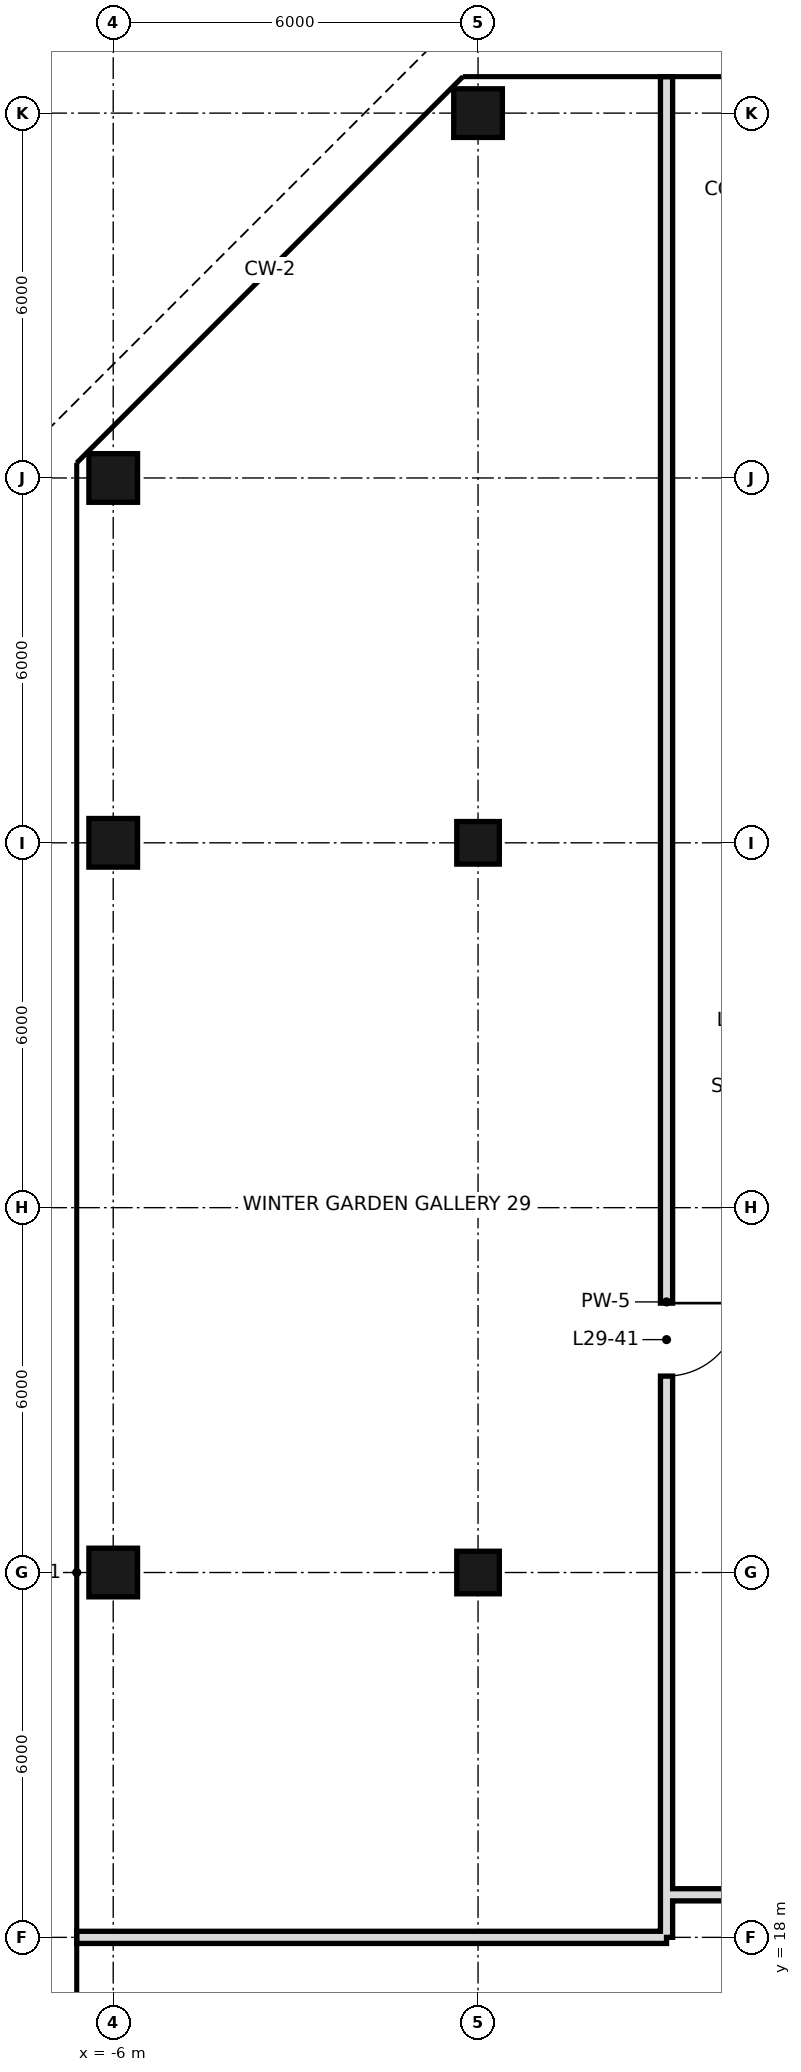
"""IFC4 building model, lengths in metres.
Left out: names, types, materials, properties, quantities, classifications, styles, units other than length and angle.
Written with IfcOpenShell. Run it as: python <this file> out.ifc"""

import sys

from ifc_helpers import new_model, si_unit, direction, frame, frame_2d, origin, origin_2d, place, context, subcontext, project, spatial, rectangle, hollow_rectangle, extrude, element, fill, save


model = new_model("IFC4")
c1 = context("Model", 3, precision=1e-05, world=origin(), true_north=direction((0.0, 1.0)))
c2 = subcontext(c1, "Body", "Model", "MODEL_VIEW")
j1 = project(units=[si_unit("LENGTHUNIT", "METRE"), si_unit("PLANEANGLEUNIT", "RADIAN")], contexts=[c1])
p1 = place(None, origin())
s1 = spatial("IfcSite", under=j1, at=p1, CompositionType="ELEMENT")
p2 = place(p1, origin())
s2 = spatial("IfcBuilding", under=s1, at=p2, CompositionType="ELEMENT")
p3 = place(p2, frame((0.0, 0.0, 130.4)))
s3 = spatial("IfcBuildingStorey", under=s2, at=p3, CompositionType="ELEMENT", Elevation=130.4)
for number, where, z_axis, x_axis in (
    (1, (-6.0, 24.0, 0.0), (0.0, 0.0, 1.0), (1.0, 0.0, 0.0)),
    (2, (-6.0, 36.0, 0.0), (0.0, 0.0, 1.0), (1.0, 0.0, 0.0)),
    (3, (-6.0, 42.0, 0.0), (0.0, 0.0, 1.0), (1.0, 0.0, 0.0)),
):
    element("IfcColumn", number, at=place(p3, frame(where, z_axis=z_axis, x_axis=x_axis)), inside=s3, PredefinedType="COLUMN", context=c2, shape_type="SweptSolid", body=[
        extrude(hollow_rectangle(XDim=0.8, YDim=0.8, WallThickness=0.04, at=origin_2d()), origin(), (0.0, 0.0, 1.0), 3.6),
    ])
for number, where, z_axis, x_axis in (
    (4, (0.0, 24.0, 0.0), (0.0, 0.0, 1.0), (1.0, 0.0, 0.0)),
    (5, (0.0, 36.0, 0.0), (0.0, 0.0, 1.0), (1.0, 0.0, 0.0)),
):
    element("IfcColumn", number, at=place(p3, frame(where, z_axis=z_axis, x_axis=x_axis)), inside=s3, PredefinedType="COLUMN", context=c2, shape_type="SweptSolid", body=[
        extrude(hollow_rectangle(XDim=0.7, YDim=0.7, WallThickness=0.036, at=origin_2d()), origin(), (0.0, 0.0, 1.0), 3.6),
    ])
p4 = place(p3, frame((0.0, 48.0, 0.0), z_axis=(0.0, 0.0, 1.0), x_axis=(1.0, 0.0, 0.0)))
e6 = element("IfcColumn", 6, at=p4, inside=s3, PredefinedType="COLUMN", context=c2, shape_type="SweptSolid", body=[
    extrude(hollow_rectangle(XDim=0.8, YDim=0.8, WallThickness=0.04, at=origin_2d()), origin(), (0.0, 0.0, 1.0), 3.6),
])
p5 = place(p3, frame((3.1, 18.0, 0.0), z_axis=(0.0, 0.0, 1.0), x_axis=(0.0, 1.0, 0.0)))
e7 = element("IfcWall", 7, at=p5, inside=s3, PredefinedType="SOLIDWALL", context=c2, shape_type="SweptSolid", body=[
    extrude(rectangle(XDim=30.6, YDim=0.2, at=frame_2d((15.3, 0.0))), origin(), (0.0, 0.0, 1.0), 2.72),
])
p6 = place(p5, frame((9.23, 0.0, 0.0)))
e8 = element("IfcOpeningElement", 8, at=p6, cuts=e7, PredefinedType="OPENING", context=c2, shape_type="SweptSolid", body=[
    extrude(rectangle(XDim=1.2, YDim=2.4, at=frame_2d((0.6, 1.2))), frame((0.0, 0.11, 0.0), z_axis=(0.0, -1.0, 0.0), x_axis=(1.0, 0.0, 0.0)), (0.0, 0.0, 1.0), 0.22),
])
p7 = place(p3, frame((-6.6, 18.0, 0.0), z_axis=(0.0, 0.0, 1.0), x_axis=(1.0, 0.0, 0.0)))
e9 = element("IfcWall", 9, at=p7, inside=s3, PredefinedType="SOLIDWALL", context=c2, shape_type="SweptSolid", body=[
    extrude(rectangle(XDim=9.7, YDim=0.2, at=frame_2d((4.85, 0.0))), origin(), (0.0, 0.0, 1.0), 2.72),
])
p8 = place(p3, frame((3.1, 18.7, 0.0), z_axis=(0.0, 0.0, 1.0), x_axis=(1.0, 0.0, 0.0)))
e10 = element("IfcWall", 10, at=p8, inside=s3, PredefinedType="SOLIDWALL", context=c2, shape_type="SweptSolid", body=[
    extrude(rectangle(XDim=22.1, YDim=0.2, at=frame_2d((11.05, 0.0))), origin(), (0.0, 0.0, 1.0), 2.72),
])
p9 = place(p8, frame((19.36, 0.0, 0.0)))
e11 = element("IfcOpeningElement", 11, at=p9, cuts=e10, PredefinedType="OPENING", context=c2, shape_type="SweptSolid", body=[
    extrude(rectangle(XDim=1.2, YDim=2.4, at=frame_2d((0.6, 1.2))), frame((0.0, 0.11, 0.0), z_axis=(0.0, -1.0, 0.0), x_axis=(1.0, 0.0, 0.0)), (0.0, 0.0, 1.0), 0.22),
])
p10 = place(p6, origin())
e12 = element("IfcDoor", 12, at=p10, inside=s3, OperationType="SINGLE_SWING_RIGHT", PredefinedType="DOOR", context=c2, shape_type="SweptSolid", body=[
    extrude(rectangle(XDim=1.2, YDim=2.4, at=frame_2d((0.6, 1.2))), frame((0.0, 0.025, 0.0), z_axis=(0.0, -1.0, 0.0), x_axis=(1.0, 0.0, 0.0)), (0.0, 0.0, 1.0), 0.05),
])
fill(e8, e12)
save(model, sys.argv[1])
